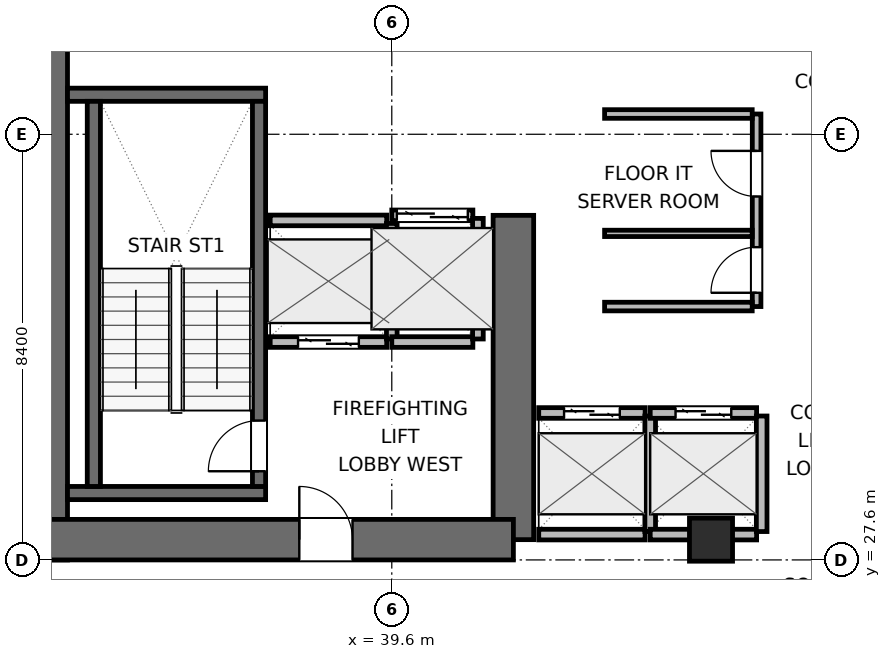
"""IFC4 building model, lengths in metres.
Left out: names, types, materials, properties, quantities, classifications, styles, units other than length and angle.
Written with IfcOpenShell. Run it as: python <this file> out.ifc"""

import sys

from ifc_helpers import new_model, si_unit, direction, frame, frame_2d, origin, origin_2d, place, context, subcontext, project, spatial, rectangle, extrude, element, fill, save


model = new_model("IFC4")
c1 = context("Model", 3, precision=1e-05, world=origin(), true_north=direction((0.0, 1.0)))
c2 = subcontext(c1, "Body", "Model", "MODEL_VIEW")
j1 = project(units=[si_unit("LENGTHUNIT", "METRE"), si_unit("PLANEANGLEUNIT", "RADIAN")], contexts=[c1])
p1 = place(None, origin())
s1 = spatial("IfcSite", under=j1, at=p1, CompositionType="ELEMENT")
p2 = place(p1, origin())
s2 = spatial("IfcBuilding", under=s1, at=p2, CompositionType="ELEMENT")
p3 = place(p2, frame((0.0, 0.0, 101.4)))
s3 = spatial("IfcBuildingStorey", under=s2, at=p3, CompositionType="ELEMENT", Elevation=101.4)
p4 = place(p3, frame((32.8, 27.6, 0.0), z_axis=(0.0, 0.0, 1.0), x_axis=(0.0, 1.0, 0.0)))
e1 = element("IfcWall", 1, at=p4, inside=s3, PredefinedType="SHEAR", context=c2, shape_type="SweptSolid", body=[
    extrude(rectangle(XDim=16.8, YDim=0.8, at=frame_2d((8.4, 0.0))), origin(), (0.0, 0.0, 1.0), 3.9),
])
p5 = place(p3, frame((42.0, 28.0, 0.0), z_axis=(0.0, 0.0, 1.0), x_axis=(0.0, 1.0, 0.0)))
e2 = element("IfcWall", 2, at=p5, inside=s3, PredefinedType="SHEAR", context=c2, shape_type="SweptSolid", body=[
    extrude(rectangle(XDim=6.4, YDim=0.8, at=frame_2d((3.2, 0.0))), origin(), (0.0, 0.0, 1.0), 3.9),
])
p6 = place(p3, frame((32.8, 28.0, 0.0), z_axis=(0.0, 0.0, 1.0), x_axis=(1.0, 0.0, 0.0)))
e3 = element("IfcWall", 3, at=p6, inside=s3, PredefinedType="SHEAR", context=c2, shape_type="SweptSolid", body=[
    extrude(rectangle(XDim=9.2, YDim=0.8, at=frame_2d((4.6, 0.0))), origin(), (0.0, 0.0, 1.0), 3.9),
])
p7 = place(p6, frame((4.975, 0.0, 0.0)))
e4 = element("IfcOpeningElement", 4, at=p7, cuts=e3, PredefinedType="OPENING", context=c2, shape_type="SweptSolid", body=[
    extrude(rectangle(XDim=1.05, YDim=2.04, at=frame_2d((0.525, 1.02))), frame((0.0, 0.41, 0.0), z_axis=(0.0, -1.0, 0.0), x_axis=(1.0, 0.0, 0.0)), (0.0, 0.0, 1.0), 0.82),
])
for number, where, z_axis, x_axis in (
    (5, (33.2, 28.92, 0.0), (0.0, 0.0, 1.0), (1.0, 0.0, 0.0)),
    (6, (33.2, 36.78, 0.0), (0.0, 0.0, 1.0), (1.0, 0.0, 0.0)),
):
    element("IfcWall", number, at=place(p3, frame(where, z_axis=z_axis, x_axis=x_axis)), inside=s3, PredefinedType="SHEAR", context=c2, shape_type="SweptSolid", body=[
        extrude(rectangle(XDim=3.91, YDim=0.26, at=frame_2d((1.955, 0.0))), origin(), (0.0, 0.0, 1.0), 3.9),
    ])
p8 = place(p3, frame((33.72, 29.05, 0.0), z_axis=(0.0, 0.0, 1.0), x_axis=(0.0, 1.0, 0.0)))
e7 = element("IfcWall", 7, at=p8, inside=s3, PredefinedType="SHEAR", context=c2, shape_type="SweptSolid", body=[
    extrude(rectangle(XDim=7.6, YDim=0.26, at=frame_2d((3.8, 0.0))), origin(), (0.0, 0.0, 1.0), 3.9),
])
p9 = place(p3, frame((36.98, 29.05, 0.0), z_axis=(0.0, 0.0, 1.0), x_axis=(0.0, 1.0, 0.0)))
e8 = element("IfcWall", 8, at=p9, inside=s3, PredefinedType="SHEAR", context=c2, shape_type="SweptSolid", body=[
    extrude(rectangle(XDim=7.6, YDim=0.26, at=frame_2d((3.8, 0.0))), origin(), (0.0, 0.0, 1.0), 3.9),
])
p10 = place(p9, frame((0.3, 0.0, 0.0)))
e9 = element("IfcOpeningElement", 9, at=p10, cuts=e8, PredefinedType="OPENING", context=c2, shape_type="SweptSolid", body=[
    extrude(rectangle(XDim=1.0, YDim=2.04, at=frame_2d((0.5, 1.02))), frame((0.0, 0.14, 0.0), z_axis=(0.0, -1.0, 0.0), x_axis=(1.0, 0.0, 0.0)), (0.0, 0.0, 1.0), 0.28),
])
p11 = place(p3, frame((45.9, 28.0, 0.0), z_axis=(0.0, 0.0, 1.0), x_axis=(1.0, 0.0, 0.0)))
e10 = element("IfcColumn", 10, at=p11, inside=s3, PredefinedType="COLUMN", context=c2, shape_type="SweptSolid", body=[
    extrude(rectangle(XDim=0.85, YDim=0.85, at=origin_2d()), origin(), (0.0, 0.0, 1.0), 3.9),
])
p12 = place(p3, frame((37.2, 31.9, 0.0), z_axis=(0.0, 0.0, 1.0), x_axis=(1.0, 0.0, 0.0)))
e11 = element("IfcWall", 11, at=p12, inside=s3, PredefinedType="PARTITIONING", context=c2, shape_type="SweptSolid", body=[
    extrude(rectangle(XDim=2.3, YDim=0.21, at=frame_2d((1.15, 0.0))), origin(), (0.0, 0.0, 1.0), 3.64),
])
p13 = place(p12, frame((0.55, 0.0, 0.0)))
e12 = element("IfcOpeningElement", 12, at=p13, cuts=e11, PredefinedType="OPENING", context=c2, shape_type="SweptSolid", body=[
    extrude(rectangle(XDim=1.2, YDim=2.04, at=frame_2d((0.6, 1.02))), frame((0.0, 0.115, 0.0), z_axis=(0.0, -1.0, 0.0), x_axis=(1.0, 0.0, 0.0)), (0.0, 0.0, 1.0), 0.23),
])
p14 = place(p3, frame((37.2, 34.3, 0.0), z_axis=(0.0, 0.0, 1.0), x_axis=(1.0, 0.0, 0.0)))
e13 = element("IfcWall", 13, at=p14, inside=s3, PredefinedType="PARTITIONING", context=c2, shape_type="SweptSolid", body=[
    extrude(rectangle(XDim=2.3, YDim=0.21, at=frame_2d((1.15, 0.0))), origin(), (0.0, 0.0, 1.0), 3.64),
])
p15 = place(p3, frame((39.6, 31.96, 0.0), z_axis=(0.0, 0.0, 1.0), x_axis=(0.0, 1.0, 0.0)))
e14 = element("IfcWall", 14, at=p15, inside=s3, PredefinedType="PARTITIONING", context=c2, shape_type="SweptSolid", body=[
    extrude(rectangle(XDim=2.28, YDim=0.21, at=frame_2d((1.14, 0.0))), origin(), (0.0, 0.0, 1.0), 3.64),
])
p16 = place(p3, frame((39.6, 34.4, 0.0), z_axis=(0.0, 0.0, 1.0), x_axis=(1.0, 0.0, 0.0)))
e15 = element("IfcWall", 15, at=p16, inside=s3, PredefinedType="PARTITIONING", context=c2, shape_type="SweptSolid", body=[
    extrude(rectangle(XDim=1.6, YDim=0.21, at=frame_2d((0.8, 0.0))), origin(), (0.0, 0.0, 1.0), 3.64),
])
p17 = place(p16, frame((0.1, 0.0, 0.0)))
e16 = element("IfcOpeningElement", 16, at=p17, cuts=e15, PredefinedType="OPENING", context=c2, shape_type="SweptSolid", body=[
    extrude(rectangle(XDim=1.4, YDim=2.06, at=frame_2d((0.7, 1.03))), frame((0.0, 0.115, 0.0), z_axis=(0.0, -1.0, 0.0), x_axis=(1.0, 0.0, 0.0)), (0.0, 0.0, 1.0), 0.23),
])
p18 = place(p3, frame((39.6, 31.9, 0.0), z_axis=(0.0, 0.0, 1.0), x_axis=(1.0, 0.0, 0.0)))
e17 = element("IfcWall", 17, at=p18, inside=s3, PredefinedType="PARTITIONING", context=c2, shape_type="SweptSolid", body=[
    extrude(rectangle(XDim=1.6, YDim=0.21, at=frame_2d((0.8, 0.0))), origin(), (0.0, 0.0, 1.0), 3.64),
])
p19 = place(p3, frame((41.3, 31.96, 0.0), z_axis=(0.0, 0.0, 1.0), x_axis=(0.0, 1.0, 0.0)))
e18 = element("IfcWall", 18, at=p19, inside=s3, PredefinedType="PARTITIONING", context=c2, shape_type="SweptSolid", body=[
    extrude(rectangle(XDim=2.38, YDim=0.21, at=frame_2d((1.19, 0.0))), origin(), (0.0, 0.0, 1.0), 3.64),
])
p20 = place(p3, frame((42.5, 30.5, 0.0), z_axis=(0.0, 0.0, 1.0), x_axis=(1.0, 0.0, 0.0)))
e19 = element("IfcWall", 19, at=p20, inside=s3, PredefinedType="PARTITIONING", context=c2, shape_type="SweptSolid", body=[
    extrude(rectangle(XDim=2.1, YDim=0.21, at=frame_2d((1.05, 0.0))), origin(), (0.0, 0.0, 1.0), 3.64),
])
p21 = place(p20, frame((0.5, 0.0, 0.0)))
e20 = element("IfcOpeningElement", 20, at=p21, cuts=e19, PredefinedType="OPENING", context=c2, shape_type="SweptSolid", body=[
    extrude(rectangle(XDim=1.1, YDim=2.04, at=frame_2d((0.55, 1.02))), frame((0.0, 0.115, 0.0), z_axis=(0.0, -1.0, 0.0), x_axis=(1.0, 0.0, 0.0)), (0.0, 0.0, 1.0), 0.23),
])
p22 = place(p3, frame((42.5, 28.1, 0.0), z_axis=(0.0, 0.0, 1.0), x_axis=(1.0, 0.0, 0.0)))
e21 = element("IfcWall", 21, at=p22, inside=s3, PredefinedType="PARTITIONING", context=c2, shape_type="SweptSolid", body=[
    extrude(rectangle(XDim=2.1, YDim=0.21, at=frame_2d((1.05, 0.0))), origin(), (0.0, 0.0, 1.0), 2.525),
])
p23 = place(p3, frame((44.7, 28.16, 0.0), z_axis=(0.0, 0.0, 1.0), x_axis=(0.0, 1.0, 0.0)))
e22 = element("IfcWall", 22, at=p23, inside=s3, PredefinedType="PARTITIONING", context=c2, shape_type="SweptSolid", body=[
    extrude(rectangle(XDim=2.28, YDim=0.21, at=frame_2d((1.14, 0.0))), origin(), (0.0, 0.0, 1.0), 3.64),
])
p24 = place(p3, frame((44.7, 30.5, 0.0), z_axis=(0.0, 0.0, 1.0), x_axis=(1.0, 0.0, 0.0)))
e23 = element("IfcWall", 23, at=p24, inside=s3, PredefinedType="PARTITIONING", context=c2, shape_type="SweptSolid", body=[
    extrude(rectangle(XDim=2.1, YDim=0.21, at=frame_2d((1.05, 0.0))), origin(), (0.0, 0.0, 1.0), 3.64),
])
p25 = place(p24, frame((0.5, 0.0, 0.0)))
e24 = element("IfcOpeningElement", 24, at=p25, cuts=e23, PredefinedType="OPENING", context=c2, shape_type="SweptSolid", body=[
    extrude(rectangle(XDim=1.1, YDim=2.04, at=frame_2d((0.55, 1.02))), frame((0.0, 0.115, 0.0), z_axis=(0.0, -1.0, 0.0), x_axis=(1.0, 0.0, 0.0)), (0.0, 0.0, 1.0), 0.23),
])
p26 = place(p3, frame((44.7, 28.1, 0.0), z_axis=(0.0, 0.0, 1.0), x_axis=(1.0, 0.0, 0.0)))
e25 = element("IfcWall", 25, at=p26, inside=s3, PredefinedType="PARTITIONING", context=c2, shape_type="SweptSolid", body=[
    extrude(rectangle(XDim=2.1, YDim=0.21, at=frame_2d((1.05, 0.0))), origin(), (0.0, 0.0, 1.0), 2.525),
])
p27 = place(p3, frame((46.9, 28.16, 0.0), z_axis=(0.0, 0.0, 1.0), x_axis=(0.0, 1.0, 0.0)))
e26 = element("IfcWall", 26, at=p27, inside=s3, PredefinedType="PARTITIONING", context=c2, shape_type="SweptSolid", body=[
    extrude(rectangle(XDim=2.28, YDim=0.21, at=frame_2d((1.14, 0.0))), origin(), (0.0, 0.0, 1.0), 3.64),
])
p28 = place(p3, frame((46.8, 32.6, 0.0), z_axis=(0.0, 0.0, 1.0), x_axis=(0.0, 1.0, 0.0)))
e27 = element("IfcWall", 27, at=p28, inside=s3, PredefinedType="PARTITIONING", context=c2, shape_type="SweptSolid", body=[
    extrude(rectangle(XDim=3.8, YDim=0.17, at=frame_2d((1.9, 0.0))), origin(), (0.0, 0.0, 1.0), 3.64),
])
p29 = place(p28, frame((0.272, 0.0, 0.0)))
e28 = element("IfcOpeningElement", 28, at=p29, cuts=e27, PredefinedType="OPENING", context=c2, shape_type="SweptSolid", body=[
    extrude(rectangle(XDim=0.9, YDim=2.02, at=frame_2d((0.45, 1.01))), frame((0.0, 0.095, 0.0), z_axis=(0.0, -1.0, 0.0), x_axis=(1.0, 0.0, 0.0)), (0.0, 0.0, 1.0), 0.19),
])
p30 = place(p28, frame((2.172, 0.0, 0.0)))
e29 = element("IfcOpeningElement", 29, at=p30, cuts=e27, PredefinedType="OPENING", context=c2, shape_type="SweptSolid", body=[
    extrude(rectangle(XDim=0.9, YDim=2.02, at=frame_2d((0.45, 1.01))), frame((0.0, 0.095, 0.0), z_axis=(0.0, -1.0, 0.0), x_axis=(1.0, 0.0, 0.0)), (0.0, 0.0, 1.0), 0.19),
])
for number, where, z_axis, x_axis in (
    (30, (43.8, 32.6, 0.0), (0.0, 0.0, 1.0), (1.0, 0.0, 0.0)),
    (31, (43.8, 36.4, 0.0), (0.0, 0.0, 1.0), (1.0, 0.0, 0.0)),
):
    element("IfcWall", number, at=place(p3, frame(where, z_axis=z_axis, x_axis=x_axis)), inside=s3, PredefinedType="PARTITIONING", context=c2, shape_type="SweptSolid", body=[
        extrude(rectangle(XDim=2.913, YDim=0.17, at=frame_2d((1.457, 0.0))), origin(), (0.0, 0.0, 1.0), 3.64),
    ])
p31 = place(p3, frame((43.8, 34.044, 0.0), z_axis=(0.0, 0.0, 1.0), x_axis=(1.0, 0.0, 0.0)))
e32 = element("IfcWall", 32, at=p31, inside=s3, PredefinedType="PARTITIONING", context=c2, shape_type="SweptSolid", body=[
    extrude(rectangle(XDim=2.913, YDim=0.125, at=frame_2d((1.457, 0.0))), origin(), (0.0, 0.0, 1.0), 3.64),
])
p32 = place(p10, origin())
e33 = element("IfcDoor", 33, at=p32, inside=s3, OperationType="SINGLE_SWING_LEFT", PredefinedType="DOOR", context=c2, shape_type="SweptSolid", body=[
    extrude(rectangle(XDim=1.0, YDim=2.04, at=frame_2d((0.5, 1.02))), frame((0.0, 0.025, 0.0), z_axis=(0.0, -1.0, 0.0), x_axis=(1.0, 0.0, 0.0)), (0.0, 0.0, 1.0), 0.05),
])
fill(e9, e33)
p33 = place(p13, origin())
e34 = element("IfcDoor", 34, at=p33, inside=s3, OperationType="DOUBLE_DOOR_SLIDING", PredefinedType="DOOR", context=c2, shape_type="SweptSolid", body=[
    extrude(rectangle(XDim=1.2, YDim=2.04, at=frame_2d((0.6, 1.02))), frame((0.0, 0.025, 0.0), z_axis=(0.0, -1.0, 0.0), x_axis=(1.0, 0.0, 0.0)), (0.0, 0.0, 1.0), 0.05),
])
fill(e12, e34)
p34 = place(p17, origin())
e35 = element("IfcDoor", 35, at=p34, inside=s3, OperationType="DOUBLE_DOOR_SLIDING", PredefinedType="DOOR", context=c2, shape_type="SweptSolid", body=[
    extrude(rectangle(XDim=1.4, YDim=2.06, at=frame_2d((0.7, 1.03))), frame((0.0, 0.025, 0.0), z_axis=(0.0, -1.0, 0.0), x_axis=(1.0, 0.0, 0.0)), (0.0, 0.0, 1.0), 0.05),
])
fill(e16, e35)
p35 = place(p21, origin())
e36 = element("IfcDoor", 36, at=p35, inside=s3, OperationType="DOUBLE_DOOR_SLIDING", PredefinedType="DOOR", context=c2, shape_type="SweptSolid", body=[
    extrude(rectangle(XDim=1.1, YDim=2.04, at=frame_2d((0.55, 1.02))), frame((0.0, 0.025, 0.0), z_axis=(0.0, -1.0, 0.0), x_axis=(1.0, 0.0, 0.0)), (0.0, 0.0, 1.0), 0.05),
])
fill(e20, e36)
p36 = place(p25, origin())
e37 = element("IfcDoor", 37, at=p36, inside=s3, OperationType="DOUBLE_DOOR_SLIDING", PredefinedType="DOOR", context=c2, shape_type="SweptSolid", body=[
    extrude(rectangle(XDim=1.1, YDim=2.04, at=frame_2d((0.55, 1.02))), frame((0.0, 0.025, 0.0), z_axis=(0.0, -1.0, 0.0), x_axis=(1.0, 0.0, 0.0)), (0.0, 0.0, 1.0), 0.05),
])
fill(e24, e37)
p37 = place(p7, origin())
e38 = element("IfcDoor", 38, at=p37, inside=s3, OperationType="SINGLE_SWING_LEFT", PredefinedType="DOOR", context=c2, shape_type="SweptSolid", body=[
    extrude(rectangle(XDim=1.05, YDim=2.04, at=frame_2d((0.525, 1.02))), frame((0.0, 0.025, 0.0), z_axis=(0.0, -1.0, 0.0), x_axis=(1.0, 0.0, 0.0)), (0.0, 0.0, 1.0), 0.05),
])
fill(e4, e38)
p38 = place(p29, origin())
e39 = element("IfcDoor", 39, at=p38, inside=s3, OperationType="SINGLE_SWING_LEFT", PredefinedType="DOOR", context=c2, shape_type="SweptSolid", body=[
    extrude(rectangle(XDim=0.9, YDim=2.02, at=frame_2d((0.45, 1.01))), frame((0.0, 0.025, 0.0), z_axis=(0.0, -1.0, 0.0), x_axis=(1.0, 0.0, 0.0)), (0.0, 0.0, 1.0), 0.05),
])
fill(e28, e39)
p39 = place(p30, origin())
e40 = element("IfcDoor", 40, at=p39, inside=s3, OperationType="SINGLE_SWING_RIGHT", PredefinedType="DOOR", context=c2, shape_type="SweptSolid", body=[
    extrude(rectangle(XDim=0.9, YDim=2.02, at=frame_2d((0.45, 1.01))), frame((0.0, 0.025, 0.0), z_axis=(0.0, -1.0, 0.0), x_axis=(1.0, 0.0, 0.0)), (0.0, 0.0, 1.0), 0.05),
])
fill(e29, e40)
save(model, sys.argv[1])
